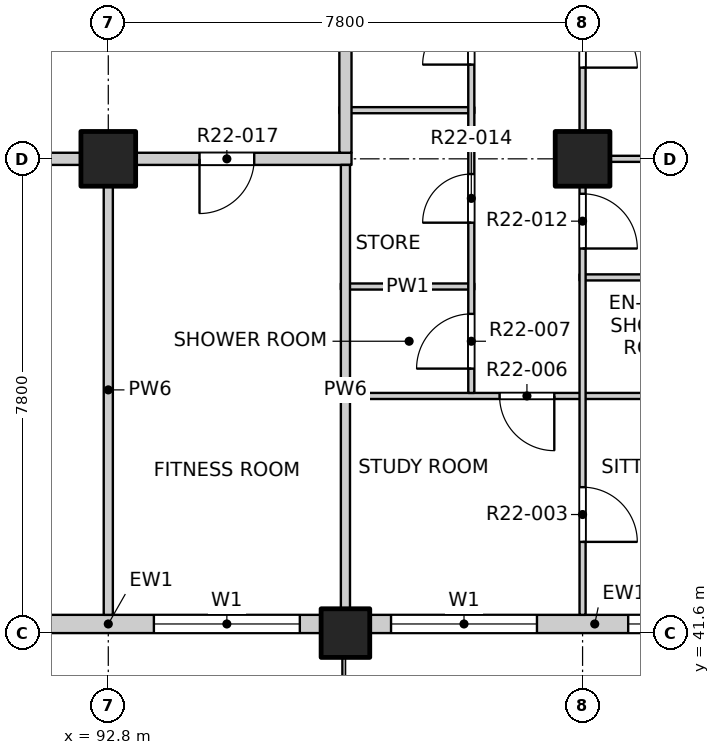
"""IFC4 building model, lengths in metres.
Left out: names, types, materials, properties, quantities, classifications, styles, units other than length and angle.
Written with IfcOpenShell. Run it as: python <this file> out.ifc"""

import sys

from ifc_helpers import new_model, si_unit, direction, frame, frame_2d, origin, origin_2d, place, context, subcontext, project, spatial, rectangle, extrude, element, fill, save


model = new_model("IFC4")
c1 = context("Model", 3, precision=1e-05, world=origin(), true_north=direction((0.0, 1.0)))
c2 = subcontext(c1, "Body", "Model", "MODEL_VIEW")
j1 = project(units=[si_unit("LENGTHUNIT", "METRE"), si_unit("PLANEANGLEUNIT", "RADIAN")], contexts=[c1])
p1 = place(None, origin())
s1 = spatial("IfcSite", under=j1, at=p1, CompositionType="ELEMENT")
p2 = place(p1, origin())
s2 = spatial("IfcBuilding", under=s1, at=p2, CompositionType="ELEMENT")
p3 = place(p2, frame((0.0, 0.0, 231.3)))
s3 = spatial("IfcBuildingStorey", under=s2, at=p3, CompositionType="ELEMENT", Elevation=231.3)
p4 = place(p3, frame((96.7, 41.6, -0.25), z_axis=(0.0, 0.0, 1.0), x_axis=(1.0, 0.0, 0.0)))
e1 = element("IfcColumn", 1, at=p4, inside=s3, PredefinedType="COLUMN", context=c2, shape_type="SweptSolid", body=[
    extrude(rectangle(XDim=0.8, YDim=0.8, at=origin_2d()), origin(), (0.0, 0.0, 1.0), 3.4),
])
for number, where, z_axis, x_axis in (
    (2, (92.8, 49.4, -0.25), (0.0, 0.0, 1.0), (1.0, 0.0, 0.0)),
    (3, (100.6, 49.4, -0.25), (0.0, 0.0, 1.0), (1.0, 0.0, 0.0)),
):
    element("IfcColumn", number, at=place(p3, frame(where, z_axis=z_axis, x_axis=x_axis)), inside=s3, PredefinedType="COLUMN", context=c2, shape_type="SweptSolid", body=[
        extrude(rectangle(XDim=0.9, YDim=0.9, at=origin_2d()), origin(), (0.0, 0.0, 1.0), 3.4),
    ])
p5 = place(p3, frame((89.3, 41.75, 0.0), z_axis=(0.0, 0.0, 1.0), x_axis=(1.0, 0.0, 0.0)))
e4 = element("IfcWall", 4, at=p5, inside=s3, PredefinedType="SOLIDWALL", context=c2, shape_type="SweptSolid", body=[
    extrude(rectangle(XDim=7.0, YDim=0.3, at=frame_2d((3.5, 0.0))), origin(), (0.0, 0.0, 1.0), 2.7),
])
p6 = place(p5, frame((0.65, 0.0, 0.0)))
e5 = element("IfcOpeningElement", 5, at=p6, cuts=e4, PredefinedType="OPENING", context=c2, shape_type="SweptSolid", body=[
    extrude(rectangle(XDim=1.8, YDim=2.4, at=frame_2d((0.9, 1.2))), frame((0.0, 0.16, 0.0), z_axis=(0.0, -1.0, 0.0), x_axis=(1.0, 0.0, 0.0)), (0.0, 0.0, 1.0), 0.32),
])
p7 = place(p5, frame((4.25, 0.0, 0.9)))
e6 = element("IfcOpeningElement", 6, at=p7, cuts=e4, PredefinedType="OPENING", context=c2, shape_type="SweptSolid", body=[
    extrude(rectangle(XDim=2.4, YDim=1.8, at=frame_2d((1.2, 0.9))), frame((0.0, 0.16, 0.0), z_axis=(0.0, -1.0, 0.0), x_axis=(1.0, 0.0, 0.0)), (0.0, 0.0, 1.0), 0.32),
])
p8 = place(p3, frame((97.1, 41.75, 0.0), z_axis=(0.0, 0.0, 1.0), x_axis=(1.0, 0.0, 0.0)))
e7 = element("IfcWall", 7, at=p8, inside=s3, PredefinedType="SOLIDWALL", context=c2, shape_type="SweptSolid", body=[
    extrude(rectangle(XDim=7.4, YDim=0.3, at=frame_2d((3.7, 0.0))), origin(), (0.0, 0.0, 1.0), 2.7),
])
p9 = place(p8, frame((0.35, 0.0, 0.9)))
e8 = element("IfcOpeningElement", 8, at=p9, cuts=e7, PredefinedType="OPENING", context=c2, shape_type="SweptSolid", body=[
    extrude(rectangle(XDim=2.4, YDim=1.8, at=frame_2d((1.2, 0.9))), frame((0.0, 0.16, 0.0), z_axis=(0.0, -1.0, 0.0), x_axis=(1.0, 0.0, 0.0)), (0.0, 0.0, 1.0), 0.32),
])
p10 = place(p8, frame((4.25, 0.0, 0.9)))
e9 = element("IfcOpeningElement", 9, at=p10, cuts=e7, PredefinedType="OPENING", context=c2, shape_type="SweptSolid", body=[
    extrude(rectangle(XDim=2.4, YDim=1.8, at=frame_2d((1.2, 0.9))), frame((0.0, 0.16, 0.0), z_axis=(0.0, -1.0, 0.0), x_axis=(1.0, 0.0, 0.0)), (0.0, 0.0, 1.0), 0.32),
])
p11 = place(p3, frame((96.625, 45.5, 0.0), z_axis=(0.0, 0.0, 1.0), x_axis=(1.0, 0.0, 0.0)))
e10 = element("IfcWall", 10, at=p11, inside=s3, PredefinedType="PARTITIONING", context=c2, shape_type="SweptSolid", body=[
    extrude(rectangle(XDim=11.475, YDim=0.1, at=frame_2d((5.738, 0.0))), origin(), (0.0, 0.0, 1.0), 3.15),
])
p12 = place(p11, frame((2.61, 0.0, 0.0)))
e11 = element("IfcOpeningElement", 11, at=p12, cuts=e10, PredefinedType="OPENING", context=c2, shape_type="SweptSolid", body=[
    extrude(rectangle(XDim=0.9, YDim=2.1, at=frame_2d((0.45, 1.05))), frame((0.0, 0.06, 0.0), z_axis=(0.0, -1.0, 0.0), x_axis=(1.0, 0.0, 0.0)), (0.0, 0.0, 1.0), 0.12),
])
p13 = place(p3, frame((96.625, 47.3, 0.0), z_axis=(0.0, 0.0, 1.0), x_axis=(1.0, 0.0, 0.0)))
e12 = element("IfcWall", 12, at=p13, inside=s3, PredefinedType="PARTITIONING", context=c2, shape_type="SweptSolid", body=[
    extrude(rectangle(XDim=2.195, YDim=0.1, at=frame_2d((1.098, 0.0))), origin(), (0.0, 0.0, 1.0), 3.15),
])
p14 = place(p3, frame((100.55, 47.45, 0.0), z_axis=(0.0, 0.0, 1.0), x_axis=(1.0, 0.0, 0.0)))
e13 = element("IfcWall", 13, at=p14, inside=s3, PredefinedType="PARTITIONING", context=c2, shape_type="SweptSolid", body=[
    extrude(rectangle(XDim=3.7, YDim=0.1, at=frame_2d((1.85, 0.0))), origin(), (0.0, 0.0, 1.0), 3.15),
])
p15 = place(p3, frame((73.2, 49.4, 0.0), z_axis=(0.0, 0.0, 1.0), x_axis=(1.0, 0.0, 0.0)))
e14 = element("IfcWall", 14, at=p15, inside=s3, PredefinedType="PARTITIONING", context=c2, shape_type="SweptSolid", body=[
    extrude(rectangle(XDim=23.6, YDim=0.2, at=frame_2d((11.8, 0.0))), origin(), (0.0, 0.0, 1.0), 3.15),
])
p16 = place(p15, frame((5.35, 0.0, 0.0)))
e15 = element("IfcOpeningElement", 15, at=p16, cuts=e14, PredefinedType="OPENING", context=c2, shape_type="SweptSolid", body=[
    extrude(rectangle(XDim=1.2, YDim=2.1, at=frame_2d((0.6, 1.05))), frame((0.0, 0.11, 0.0), z_axis=(0.0, -1.0, 0.0), x_axis=(1.0, 0.0, 0.0)), (0.0, 0.0, 1.0), 0.22),
])
p17 = place(p15, frame((15.1, 0.0, 0.0)))
e16 = element("IfcOpeningElement", 16, at=p17, cuts=e14, PredefinedType="OPENING", context=c2, shape_type="SweptSolid", body=[
    extrude(rectangle(XDim=1.2, YDim=2.1, at=frame_2d((0.6, 1.05))), frame((0.0, 0.11, 0.0), z_axis=(0.0, -1.0, 0.0), x_axis=(1.0, 0.0, 0.0)), (0.0, 0.0, 1.0), 0.22),
])
p18 = place(p15, frame((21.1, 0.0, 0.0)))
e17 = element("IfcOpeningElement", 17, at=p18, cuts=e14, PredefinedType="OPENING", context=c2, shape_type="SweptSolid", body=[
    extrude(rectangle(XDim=0.9, YDim=2.1, at=frame_2d((0.45, 1.05))), frame((0.0, 0.11, 0.0), z_axis=(0.0, -1.0, 0.0), x_axis=(1.0, 0.0, 0.0)), (0.0, 0.0, 1.0), 0.22),
])
p19 = place(p3, frame((100.55, 49.4, 0.0), z_axis=(0.0, 0.0, 1.0), x_axis=(1.0, 0.0, 0.0)))
e18 = element("IfcWall", 18, at=p19, inside=s3, PredefinedType="PARTITIONING", context=c2, shape_type="SweptSolid", body=[
    extrude(rectangle(XDim=7.55, YDim=0.1, at=frame_2d((3.775, 0.0))), origin(), (0.0, 0.0, 1.0), 3.15),
])
p20 = place(p3, frame((96.6, 50.2, 0.0), z_axis=(0.0, 0.0, 1.0), x_axis=(1.0, 0.0, 0.0)))
e19 = element("IfcWall", 19, at=p20, inside=s3, PredefinedType="PARTITIONING", context=c2, shape_type="SweptSolid", body=[
    extrude(rectangle(XDim=2.22, YDim=0.1, at=frame_2d((1.11, 0.0))), origin(), (0.0, 0.0, 1.0), 3.15),
])
for number, where, z_axis, x_axis in (
    (20, (92.8, 41.9, 0.0), (0.0, 0.0, 1.0), (0.0, 1.0, 0.0)),
    (21, (96.7, 41.9, 0.0), (0.0, 0.0, 1.0), (0.0, 1.0, 0.0)),
):
    element("IfcWall", number, at=place(p3, frame(where, z_axis=z_axis, x_axis=x_axis)), inside=s3, PredefinedType="PARTITIONING", context=c2, shape_type="SweptSolid", body=[
        extrude(rectangle(XDim=7.4, YDim=0.15, at=frame_2d((3.7, 0.0))), origin(), (0.0, 0.0, 1.0), 3.15),
    ])
p21 = place(p3, frame((96.7, 49.5, 0.0), z_axis=(0.0, 0.0, 1.0), x_axis=(0.0, 1.0, 0.0)))
e22 = element("IfcWall", 22, at=p21, inside=s3, PredefinedType="PARTITIONING", context=c2, shape_type="SweptSolid", body=[
    extrude(rectangle(XDim=34.9, YDim=0.2, at=frame_2d((17.45, 0.0))), origin(), (0.0, 0.0, 1.0), 3.15),
])
p22 = place(p21, frame((9.675, 0.0, 0.0)))
e23 = element("IfcOpeningElement", 23, at=p22, cuts=e22, PredefinedType="OPENING", context=c2, shape_type="SweptSolid", body=[
    extrude(rectangle(XDim=1.0, YDim=2.1, at=frame_2d((0.5, 1.05))), frame((0.0, 0.11, 0.0), z_axis=(0.0, -1.0, 0.0), x_axis=(1.0, 0.0, 0.0)), (0.0, 0.0, 1.0), 0.22),
])
p23 = place(p21, frame((22.925, 0.0, 0.0)))
e24 = element("IfcOpeningElement", 24, at=p23, cuts=e22, PredefinedType="OPENING", context=c2, shape_type="SweptSolid", body=[
    extrude(rectangle(XDim=1.0, YDim=2.1, at=frame_2d((0.5, 1.05))), frame((0.0, 0.11, 0.0), z_axis=(0.0, -1.0, 0.0), x_axis=(1.0, 0.0, 0.0)), (0.0, 0.0, 1.0), 0.22),
])
p24 = place(p21, frame((33.025, 0.0, 0.0)))
e25 = element("IfcOpeningElement", 25, at=p24, cuts=e22, PredefinedType="OPENING", context=c2, shape_type="SweptSolid", body=[
    extrude(rectangle(XDim=1.0, YDim=2.1, at=frame_2d((0.5, 1.05))), frame((0.0, 0.11, 0.0), z_axis=(0.0, -1.0, 0.0), x_axis=(1.0, 0.0, 0.0)), (0.0, 0.0, 1.0), 0.22),
])
p25 = place(p3, frame((98.77, 45.55, 0.0), z_axis=(0.0, 0.0, 1.0), x_axis=(0.0, 1.0, 0.0)))
e26 = element("IfcWall", 26, at=p25, inside=s3, PredefinedType="PARTITIONING", context=c2, shape_type="SweptSolid", body=[
    extrude(rectangle(XDim=12.3, YDim=0.1, at=frame_2d((6.15, 0.0))), origin(), (0.0, 0.0, 1.0), 3.15),
])
p26 = place(p25, frame((0.4, 0.0, 0.0)))
e27 = element("IfcOpeningElement", 27, at=p26, cuts=e26, PredefinedType="OPENING", context=c2, shape_type="SweptSolid", body=[
    extrude(rectangle(XDim=0.9, YDim=2.1, at=frame_2d((0.45, 1.05))), frame((0.0, 0.06, 0.0), z_axis=(0.0, -1.0, 0.0), x_axis=(1.0, 0.0, 0.0)), (0.0, 0.0, 1.0), 0.12),
])
p27 = place(p25, frame((2.8, 0.0, 0.0)))
e28 = element("IfcOpeningElement", 28, at=p27, cuts=e26, PredefinedType="OPENING", context=c2, shape_type="SweptSolid", body=[
    extrude(rectangle(XDim=0.8, YDim=2.1, at=frame_2d((0.4, 1.05))), frame((0.0, 0.06, 0.0), z_axis=(0.0, -1.0, 0.0), x_axis=(1.0, 0.0, 0.0)), (0.0, 0.0, 1.0), 0.12),
])
p28 = place(p25, frame((5.4, 0.0, 0.0)))
e29 = element("IfcOpeningElement", 29, at=p28, cuts=e26, PredefinedType="OPENING", context=c2, shape_type="SweptSolid", body=[
    extrude(rectangle(XDim=0.8, YDim=2.1, at=frame_2d((0.4, 1.05))), frame((0.0, 0.06, 0.0), z_axis=(0.0, -1.0, 0.0), x_axis=(1.0, 0.0, 0.0)), (0.0, 0.0, 1.0), 0.12),
])
p29 = place(p25, frame((7.7, 0.0, 0.0)))
e30 = element("IfcOpeningElement", 30, at=p29, cuts=e26, PredefinedType="OPENING", context=c2, shape_type="SweptSolid", body=[
    extrude(rectangle(XDim=0.9, YDim=2.1, at=frame_2d((0.45, 1.05))), frame((0.0, 0.06, 0.0), z_axis=(0.0, -1.0, 0.0), x_axis=(1.0, 0.0, 0.0)), (0.0, 0.0, 1.0), 0.12),
])
p30 = place(p25, frame((10.45, 0.0, 0.0)))
e31 = element("IfcOpeningElement", 31, at=p30, cuts=e26, PredefinedType="OPENING", context=c2, shape_type="SweptSolid", body=[
    extrude(rectangle(XDim=0.8, YDim=2.1, at=frame_2d((0.4, 1.05))), frame((0.0, 0.06, 0.0), z_axis=(0.0, -1.0, 0.0), x_axis=(1.0, 0.0, 0.0)), (0.0, 0.0, 1.0), 0.12),
])
p31 = place(p3, frame((100.6, 41.9, 0.0), z_axis=(0.0, 0.0, 1.0), x_axis=(0.0, 1.0, 0.0)))
e32 = element("IfcWall", 32, at=p31, inside=s3, PredefinedType="PARTITIONING", context=c2, shape_type="SweptSolid", body=[
    extrude(rectangle(XDim=46.2, YDim=0.1, at=frame_2d((23.1, 0.0))), origin(), (0.0, 0.0, 1.0), 3.15),
])
p32 = place(p31, frame((1.2, 0.0, 0.0)))
e33 = element("IfcOpeningElement", 33, at=p32, cuts=e32, PredefinedType="OPENING", context=c2, shape_type="SweptSolid", body=[
    extrude(rectangle(XDim=0.9, YDim=2.1, at=frame_2d((0.45, 1.05))), frame((0.0, 0.06, 0.0), z_axis=(0.0, -1.0, 0.0), x_axis=(1.0, 0.0, 0.0)), (0.0, 0.0, 1.0), 0.12),
])
p33 = place(p31, frame((6.025, 0.0, 0.0)))
e34 = element("IfcOpeningElement", 34, at=p33, cuts=e32, PredefinedType="OPENING", context=c2, shape_type="SweptSolid", body=[
    extrude(rectangle(XDim=0.9, YDim=2.1, at=frame_2d((0.45, 1.05))), frame((0.0, 0.06, 0.0), z_axis=(0.0, -1.0, 0.0), x_axis=(1.0, 0.0, 0.0)), (0.0, 0.0, 1.0), 0.12),
])
p34 = place(p31, frame((9.0, 0.0, 0.0)))
e35 = element("IfcOpeningElement", 35, at=p34, cuts=e32, PredefinedType="OPENING", context=c2, shape_type="SweptSolid", body=[
    extrude(rectangle(XDim=0.9, YDim=2.1, at=frame_2d((0.45, 1.05))), frame((0.0, 0.06, 0.0), z_axis=(0.0, -1.0, 0.0), x_axis=(1.0, 0.0, 0.0)), (0.0, 0.0, 1.0), 0.12),
])
p35 = place(p31, frame((12.9, 0.0, 0.0)))
e36 = element("IfcOpeningElement", 36, at=p35, cuts=e32, PredefinedType="OPENING", context=c2, shape_type="SweptSolid", body=[
    extrude(rectangle(XDim=0.9, YDim=2.1, at=frame_2d((0.45, 1.05))), frame((0.0, 0.06, 0.0), z_axis=(0.0, -1.0, 0.0), x_axis=(1.0, 0.0, 0.0)), (0.0, 0.0, 1.0), 0.12),
])
p36 = place(p31, frame((17.775, 0.0, 0.0)))
e37 = element("IfcOpeningElement", 37, at=p36, cuts=e32, PredefinedType="OPENING", context=c2, shape_type="SweptSolid", body=[
    extrude(rectangle(XDim=0.9, YDim=2.1, at=frame_2d((0.45, 1.05))), frame((0.0, 0.06, 0.0), z_axis=(0.0, -1.0, 0.0), x_axis=(1.0, 0.0, 0.0)), (0.0, 0.0, 1.0), 0.12),
])
p37 = place(p31, frame((21.625, 0.0, 0.0)))
e38 = element("IfcOpeningElement", 38, at=p37, cuts=e32, PredefinedType="OPENING", context=c2, shape_type="SweptSolid", body=[
    extrude(rectangle(XDim=0.9, YDim=2.1, at=frame_2d((0.45, 1.05))), frame((0.0, 0.06, 0.0), z_axis=(0.0, -1.0, 0.0), x_axis=(1.0, 0.0, 0.0)), (0.0, 0.0, 1.0), 0.12),
])
p38 = place(p31, frame((25.575, 0.0, 0.0)))
e39 = element("IfcOpeningElement", 39, at=p38, cuts=e32, PredefinedType="OPENING", context=c2, shape_type="SweptSolid", body=[
    extrude(rectangle(XDim=0.9, YDim=2.1, at=frame_2d((0.45, 1.05))), frame((0.0, 0.06, 0.0), z_axis=(0.0, -1.0, 0.0), x_axis=(1.0, 0.0, 0.0)), (0.0, 0.0, 1.0), 0.12),
])
p39 = place(p31, frame((28.5, 0.0, 0.0)))
e40 = element("IfcOpeningElement", 40, at=p39, cuts=e32, PredefinedType="OPENING", context=c2, shape_type="SweptSolid", body=[
    extrude(rectangle(XDim=0.9, YDim=2.1, at=frame_2d((0.45, 1.05))), frame((0.0, 0.06, 0.0), z_axis=(0.0, -1.0, 0.0), x_axis=(1.0, 0.0, 0.0)), (0.0, 0.0, 1.0), 0.12),
])
p40 = place(p31, frame((33.375, 0.0, 0.0)))
e41 = element("IfcOpeningElement", 41, at=p40, cuts=e32, PredefinedType="OPENING", context=c2, shape_type="SweptSolid", body=[
    extrude(rectangle(XDim=0.9, YDim=2.1, at=frame_2d((0.45, 1.05))), frame((0.0, 0.06, 0.0), z_axis=(0.0, -1.0, 0.0), x_axis=(1.0, 0.0, 0.0)), (0.0, 0.0, 1.0), 0.12),
])
p41 = place(p31, frame((36.3, 0.0, 0.0)))
e42 = element("IfcOpeningElement", 42, at=p41, cuts=e32, PredefinedType="OPENING", context=c2, shape_type="SweptSolid", body=[
    extrude(rectangle(XDim=0.9, YDim=2.1, at=frame_2d((0.45, 1.05))), frame((0.0, 0.06, 0.0), z_axis=(0.0, -1.0, 0.0), x_axis=(1.0, 0.0, 0.0)), (0.0, 0.0, 1.0), 0.12),
])
p42 = place(p31, frame((40.2, 0.0, 0.0)))
e43 = element("IfcOpeningElement", 43, at=p42, cuts=e32, PredefinedType="OPENING", context=c2, shape_type="SweptSolid", body=[
    extrude(rectangle(XDim=0.9, YDim=2.1, at=frame_2d((0.45, 1.05))), frame((0.0, 0.06, 0.0), z_axis=(0.0, -1.0, 0.0), x_axis=(1.0, 0.0, 0.0)), (0.0, 0.0, 1.0), 0.12),
])
p43 = place(p31, frame((44.1, 0.0, 0.0)))
e44 = element("IfcOpeningElement", 44, at=p43, cuts=e32, PredefinedType="OPENING", context=c2, shape_type="SweptSolid", body=[
    extrude(rectangle(XDim=0.9, YDim=2.1, at=frame_2d((0.45, 1.05))), frame((0.0, 0.06, 0.0), z_axis=(0.0, -1.0, 0.0), x_axis=(1.0, 0.0, 0.0)), (0.0, 0.0, 1.0), 0.12),
])
p44 = place(p7, origin())
e45 = element("IfcWindow", 45, at=p44, inside=s3, PartitioningType="DOUBLE_PANEL_VERTICAL", PredefinedType="WINDOW", context=c2, shape_type="SweptSolid", body=[
    extrude(rectangle(XDim=2.4, YDim=1.8, at=frame_2d((1.2, 0.9))), frame((0.0, 0.03, 0.0), z_axis=(0.0, -1.0, 0.0), x_axis=(1.0, 0.0, 0.0)), (0.0, 0.0, 1.0), 0.06),
])
fill(e6, e45)
p45 = place(p9, origin())
e46 = element("IfcWindow", 46, at=p45, inside=s3, PartitioningType="DOUBLE_PANEL_VERTICAL", PredefinedType="WINDOW", context=c2, shape_type="SweptSolid", body=[
    extrude(rectangle(XDim=2.4, YDim=1.8, at=frame_2d((1.2, 0.9))), frame((0.0, 0.03, 0.0), z_axis=(0.0, -1.0, 0.0), x_axis=(1.0, 0.0, 0.0)), (0.0, 0.0, 1.0), 0.06),
])
fill(e8, e46)
p46 = place(p10, origin())
e47 = element("IfcWindow", 47, at=p46, inside=s3, PartitioningType="DOUBLE_PANEL_VERTICAL", PredefinedType="WINDOW", context=c2, shape_type="SweptSolid", body=[
    extrude(rectangle(XDim=2.4, YDim=1.8, at=frame_2d((1.2, 0.9))), frame((0.0, 0.03, 0.0), z_axis=(0.0, -1.0, 0.0), x_axis=(1.0, 0.0, 0.0)), (0.0, 0.0, 1.0), 0.06),
])
fill(e9, e47)
p47 = place(p32, origin())
e48 = element("IfcDoor", 48, at=p47, inside=s3, OperationType="SINGLE_SWING_RIGHT", PredefinedType="DOOR", context=c2, shape_type="SweptSolid", body=[
    extrude(rectangle(XDim=0.9, YDim=2.1, at=frame_2d((0.45, 1.05))), frame((0.0, 0.025, 0.0), z_axis=(0.0, -1.0, 0.0), x_axis=(1.0, 0.0, 0.0)), (0.0, 0.0, 1.0), 0.05),
])
fill(e33, e48)
p48 = place(p12, origin())
e49 = element("IfcDoor", 49, at=p48, inside=s3, OperationType="SINGLE_SWING_LEFT", PredefinedType="DOOR", context=c2, shape_type="SweptSolid", body=[
    extrude(rectangle(XDim=0.9, YDim=2.1, at=frame_2d((0.45, 1.05))), frame((0.0, 0.025, 0.0), z_axis=(0.0, -1.0, 0.0), x_axis=(1.0, 0.0, 0.0)), (0.0, 0.0, 1.0), 0.05),
])
fill(e11, e49)
p49 = place(p26, origin())
e50 = element("IfcDoor", 50, at=p49, inside=s3, OperationType="SINGLE_SWING_LEFT", PredefinedType="DOOR", context=c2, shape_type="SweptSolid", body=[
    extrude(rectangle(XDim=0.9, YDim=2.1, at=frame_2d((0.45, 1.05))), frame((0.0, 0.025, 0.0), z_axis=(0.0, -1.0, 0.0), x_axis=(1.0, 0.0, 0.0)), (0.0, 0.0, 1.0), 0.05),
])
fill(e27, e50)
p50 = place(p33, origin())
e51 = element("IfcDoor", 51, at=p50, inside=s3, OperationType="SINGLE_SWING_RIGHT", PredefinedType="DOOR", context=c2, shape_type="SweptSolid", body=[
    extrude(rectangle(XDim=0.9, YDim=2.1, at=frame_2d((0.45, 1.05))), frame((0.0, 0.025, 0.0), z_axis=(0.0, -1.0, 0.0), x_axis=(1.0, 0.0, 0.0)), (0.0, 0.0, 1.0), 0.05),
])
fill(e34, e51)
p51 = place(p27, origin())
e52 = element("IfcDoor", 52, at=p51, inside=s3, OperationType="SINGLE_SWING_LEFT", PredefinedType="DOOR", context=c2, shape_type="SweptSolid", body=[
    extrude(rectangle(XDim=0.8, YDim=2.1, at=frame_2d((0.4, 1.05))), frame((0.0, 0.025, 0.0), z_axis=(0.0, -1.0, 0.0), x_axis=(1.0, 0.0, 0.0)), (0.0, 0.0, 1.0), 0.05),
])
fill(e28, e52)
p52 = place(p18, origin())
e53 = element("IfcDoor", 53, at=p52, inside=s3, OperationType="SINGLE_SWING_RIGHT", PredefinedType="DOOR", context=c2, shape_type="SweptSolid", body=[
    extrude(rectangle(XDim=0.9, YDim=2.1, at=frame_2d((0.45, 1.05))), frame((0.0, 0.025, 0.0), z_axis=(0.0, -1.0, 0.0), x_axis=(1.0, 0.0, 0.0)), (0.0, 0.0, 1.0), 0.05),
])
fill(e17, e53)
p53 = place(p28, origin())
e54 = element("IfcDoor", 54, at=p53, inside=s3, OperationType="SINGLE_SWING_LEFT", PredefinedType="DOOR", context=c2, shape_type="SweptSolid", body=[
    extrude(rectangle(XDim=0.8, YDim=2.1, at=frame_2d((0.4, 1.05))), frame((0.0, 0.025, 0.0), z_axis=(0.0, -1.0, 0.0), x_axis=(1.0, 0.0, 0.0)), (0.0, 0.0, 1.0), 0.05),
])
fill(e29, e54)
p54 = place(p34, origin())
e55 = element("IfcDoor", 55, at=p54, inside=s3, OperationType="SINGLE_SWING_RIGHT", PredefinedType="DOOR", context=c2, shape_type="SweptSolid", body=[
    extrude(rectangle(XDim=0.9, YDim=2.1, at=frame_2d((0.45, 1.05))), frame((0.0, 0.025, 0.0), z_axis=(0.0, -1.0, 0.0), x_axis=(1.0, 0.0, 0.0)), (0.0, 0.0, 1.0), 0.05),
])
fill(e35, e55)
save(model, sys.argv[1])
